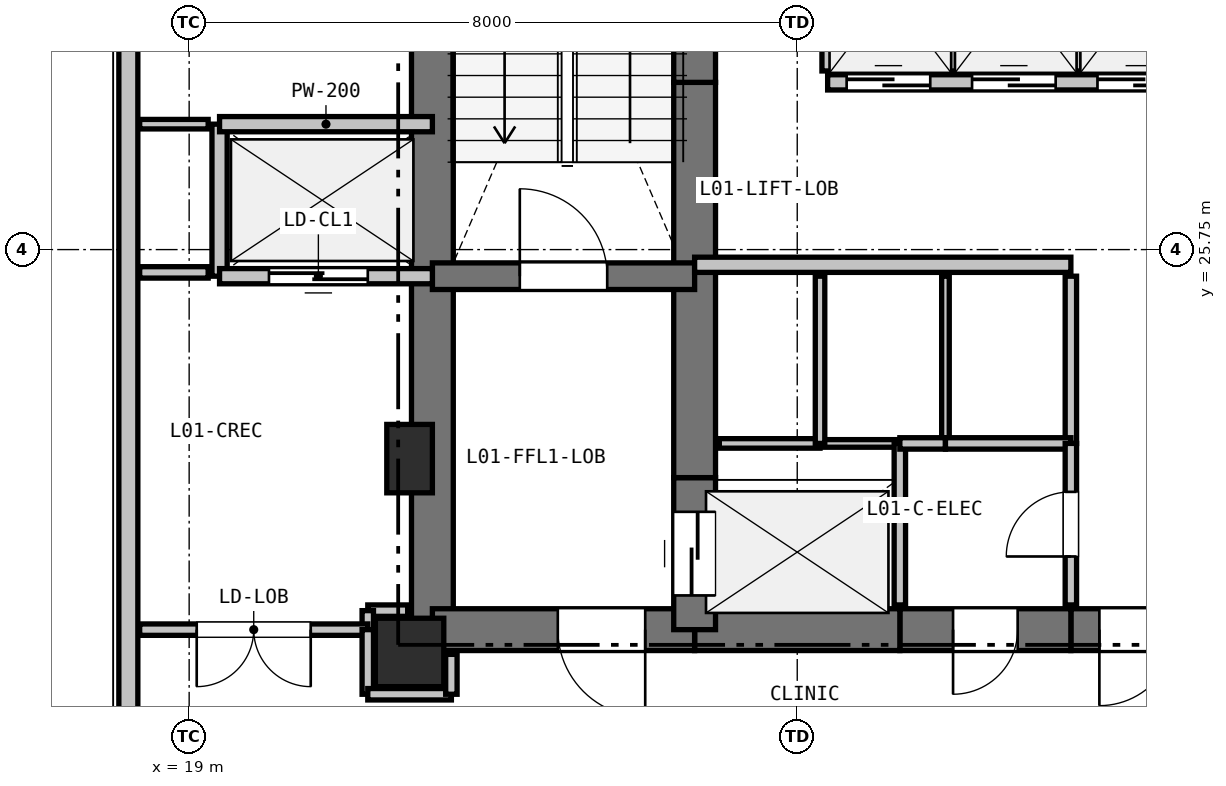
"""IFC4 building model, lengths in metres.
Left out: names, types, materials, properties, quantities, classifications, styles, units other than length and angle.
Written with IfcOpenShell. Run it as: python <this file> out.ifc"""

import sys

from ifc_helpers import new_model, si_unit, direction, frame, frame_2d, origin, origin_2d, place, context, subcontext, project, spatial, rectangle, extrude, element, fill, save


model = new_model("IFC4")
c1 = context("Model", 3, precision=1e-05, world=origin(), true_north=direction((0.0, 1.0)))
c2 = subcontext(c1, "Body", "Model", "MODEL_VIEW")
j1 = project(units=[si_unit("LENGTHUNIT", "METRE"), si_unit("PLANEANGLEUNIT", "RADIAN")], contexts=[c1])
p1 = place(None, origin())
s1 = spatial("IfcSite", under=j1, at=p1, CompositionType="ELEMENT")
p2 = place(p1, origin())
s2 = spatial("IfcBuilding", under=s1, at=p2, CompositionType="ELEMENT")
p3 = place(p2, frame((0.0, 0.0, 5.1)))
s3 = spatial("IfcBuildingStorey", under=s2, at=p3, CompositionType="ELEMENT", Elevation=5.1)
p4 = place(p3, frame((21.9, 20.45, 0.0), z_axis=(0.0, 0.0, 1.0), x_axis=(1.0, 0.0, 0.0)))
e1 = element("IfcColumn", 1, at=p4, inside=s3, PredefinedType="COLUMN", context=c2, shape_type="SweptSolid", body=[
    extrude(rectangle(XDim=0.9, YDim=0.9, at=origin_2d()), origin(), (0.0, 0.0, 1.0), 4.5),
])
p5 = place(p3, frame((21.9, 23.0, 0.0), z_axis=(0.0, 0.0, 1.0), x_axis=(1.0, 0.0, 0.0)))
e2 = element("IfcColumn", 2, at=p5, inside=s3, PredefinedType="PILASTER", context=c2, shape_type="SweptSolid", body=[
    extrude(rectangle(XDim=0.6, YDim=0.9, at=origin_2d()), origin(), (0.0, 0.0, 1.0), 4.5),
])
p6 = place(p3, frame((18.2, 18.4, 0.0), z_axis=(0.0, 0.0, 1.0), x_axis=(0.0, 1.0, 0.0)))
e3 = element("IfcWall", 3, at=p6, inside=s3, PredefinedType="SOLIDWALL", context=c2, shape_type="SweptSolid", body=[
    extrude(rectangle(XDim=16.7, YDim=0.25, at=frame_2d((8.35, 0.0))), origin(), (0.0, 0.0, 1.0), 2.565),
])
p7 = place(p3, frame((22.2, 20.75, 0.0), z_axis=(0.0, 0.0, 1.0), x_axis=(0.0, 1.0, 0.0)))
e4 = element("IfcWall", 4, at=p7, inside=s3, PredefinedType="SHEAR", context=c2, shape_type="SweptSolid", body=[
    extrude(rectangle(XDim=4.65, YDim=0.55, at=frame_2d((2.325, 0.0))), origin(), (0.0, 0.0, 1.0), 4.18),
])
p8 = place(p3, frame((22.2, 25.4, 0.0), z_axis=(0.0, 0.0, 1.0), x_axis=(0.0, 1.0, 0.0)))
e5 = element("IfcWall", 5, at=p8, inside=s3, PredefinedType="SHEAR", context=c2, shape_type="SweptSolid", body=[
    extrude(rectangle(XDim=7.35, YDim=0.55, at=frame_2d((3.675, 0.0))), origin(), (0.0, 0.0, 1.0), 4.18),
])
p9 = place(p3, frame((32.35, 20.75, 0.0), z_axis=(0.0, 0.0, 1.0), x_axis=(-1.0, 0.0, 0.0)))
e6 = element("IfcWall", 6, at=p9, inside=s3, PredefinedType="SHEAR", context=c2, shape_type="SweptSolid", body=[
    extrude(rectangle(XDim=1.75, YDim=0.55, at=frame_2d((0.875, 0.0))), origin(), (0.0, 0.0, 1.0), 4.18),
])
p10 = place(p9, frame((0.375, 0.0, 0.0)))
e7 = element("IfcOpeningElement", 7, at=p10, cuts=e6, PredefinedType="OPENING", context=c2, shape_type="SweptSolid", body=[
    extrude(rectangle(XDim=1.0, YDim=2.15, at=frame_2d((0.5, 1.075))), frame((0.0, 0.285, 0.0), z_axis=(0.0, -1.0, 0.0), x_axis=(1.0, 0.0, 0.0)), (0.0, 0.0, 1.0), 0.57),
])
p11 = place(p3, frame((30.6, 20.75, 0.0), z_axis=(0.0, 0.0, 1.0), x_axis=(-1.0, 0.0, 0.0)))
e8 = element("IfcWall", 8, at=p11, inside=s3, PredefinedType="SHEAR", context=c2, shape_type="SweptSolid", body=[
    extrude(rectangle(XDim=2.25, YDim=0.55, at=frame_2d((1.125, 0.0))), origin(), (0.0, 0.0, 1.0), 4.18),
])
p12 = place(p11, frame((0.7, 0.0, 0.0)))
e9 = element("IfcOpeningElement", 9, at=p12, cuts=e8, PredefinedType="OPENING", context=c2, shape_type="SweptSolid", body=[
    extrude(rectangle(XDim=0.85, YDim=2.1, at=frame_2d((0.425, 1.05))), frame((0.0, 0.285, 0.0), z_axis=(0.0, -1.0, 0.0), x_axis=(1.0, 0.0, 0.0)), (0.0, 0.0, 1.0), 0.57),
])
p13 = place(p3, frame((28.35, 20.75, 0.0), z_axis=(0.0, 0.0, 1.0), x_axis=(-1.0, 0.0, 0.0)))
e10 = element("IfcWall", 10, at=p13, inside=s3, PredefinedType="SHEAR", context=c2, shape_type="SweptSolid", body=[
    extrude(rectangle(XDim=2.7, YDim=0.55, at=frame_2d((1.35, 0.0))), origin(), (0.0, 0.0, 1.0), 4.18),
])
p14 = place(p3, frame((25.65, 20.75, 0.0), z_axis=(0.0, 0.0, 1.0), x_axis=(-1.0, 0.0, 0.0)))
e11 = element("IfcWall", 11, at=p14, inside=s3, PredefinedType="SHEAR", context=c2, shape_type="SweptSolid", body=[
    extrude(rectangle(XDim=3.45, YDim=0.55, at=frame_2d((1.725, 0.0))), origin(), (0.0, 0.0, 1.0), 4.18),
])
p15 = place(p14, frame((0.65, 0.0, 0.0)))
e12 = element("IfcOpeningElement", 12, at=p15, cuts=e11, PredefinedType="OPENING", context=c2, shape_type="SweptSolid", body=[
    extrude(rectangle(XDim=1.15, YDim=2.15, at=frame_2d((0.575, 1.075))), frame((0.0, 0.285, 0.0), z_axis=(0.0, -1.0, 0.0), x_axis=(1.0, 0.0, 0.0)), (0.0, 0.0, 1.0), 0.57),
])
p16 = place(p3, frame((25.65, 20.75, 0.0), z_axis=(0.0, 0.0, 1.0), x_axis=(0.0, 1.0, 0.0)))
e13 = element("IfcWall", 13, at=p16, inside=s3, PredefinedType="SHEAR", context=c2, shape_type="SweptSolid", body=[
    extrude(rectangle(XDim=2.0, YDim=0.55, at=frame_2d((1.0, 0.0))), origin(), (0.0, 0.0, 1.0), 4.18),
])
p17 = place(p16, frame((0.45, 0.0, 0.0)))
e14 = element("IfcOpeningElement", 14, at=p17, cuts=e13, PredefinedType="OPENING", context=c2, shape_type="SweptSolid", body=[
    extrude(rectangle(XDim=1.1, YDim=2.15, at=frame_2d((0.55, 1.075))), frame((0.0, 0.285, 0.0), z_axis=(0.0, -1.0, 0.0), x_axis=(1.0, 0.0, 0.0)), (0.0, 0.0, 1.0), 0.57),
])
p18 = place(p3, frame((25.65, 22.75, 0.0), z_axis=(0.0, 0.0, 1.0), x_axis=(0.0, 1.0, 0.0)))
e15 = element("IfcWall", 15, at=p18, inside=s3, PredefinedType="SHEAR", context=c2, shape_type="SweptSolid", body=[
    extrude(rectangle(XDim=2.8, YDim=0.55, at=frame_2d((1.4, 0.0))), origin(), (0.0, 0.0, 1.0), 4.18),
])
p19 = place(p3, frame((25.65, 25.55, 0.0), z_axis=(0.0, 0.0, 1.0), x_axis=(0.0, 1.0, 0.0)))
e16 = element("IfcWall", 16, at=p19, inside=s3, PredefinedType="SHEAR", context=c2, shape_type="SweptSolid", body=[
    extrude(rectangle(XDim=2.4, YDim=0.55, at=frame_2d((1.2, 0.0))), origin(), (0.0, 0.0, 1.0), 4.18),
])
p20 = place(p3, frame((25.65, 27.95, 0.0), z_axis=(0.0, 0.0, 1.0), x_axis=(0.0, 1.0, 0.0)))
e17 = element("IfcWall", 17, at=p20, inside=s3, PredefinedType="SHEAR", context=c2, shape_type="SweptSolid", body=[
    extrude(rectangle(XDim=4.8, YDim=0.55, at=frame_2d((2.4, 0.0))), origin(), (0.0, 0.0, 1.0), 4.18),
])
p21 = place(p3, frame((22.2, 25.4, 0.0), z_axis=(0.0, 0.0, 1.0), x_axis=(1.0, 0.0, 0.0)))
e18 = element("IfcWall", 18, at=p21, inside=s3, PredefinedType="SHEAR", context=c2, shape_type="SweptSolid", body=[
    extrude(rectangle(XDim=3.45, YDim=0.35, at=frame_2d((1.725, 0.0))), origin(), (0.0, 0.0, 1.0), 4.18),
])
p22 = place(p21, frame((1.15, 0.0, 0.0)))
e19 = element("IfcOpeningElement", 19, at=p22, cuts=e18, PredefinedType="OPENING", context=c2, shape_type="SweptSolid", body=[
    extrude(rectangle(XDim=1.15, YDim=2.15, at=frame_2d((0.575, 1.075))), frame((0.0, 0.185, 0.0), z_axis=(0.0, -1.0, 0.0), x_axis=(1.0, 0.0, 0.0)), (0.0, 0.0, 1.0), 0.37),
])
p23 = place(p3, frame((25.65, 25.55, 0.0), z_axis=(0.0, 0.0, 1.0), x_axis=(1.0, 0.0, 0.0)))
e20 = element("IfcWall", 20, at=p23, inside=s3, PredefinedType="PARTITIONING", context=c2, shape_type="SweptSolid", body=[
    extrude(rectangle(XDim=4.95, YDim=0.2, at=frame_2d((2.475, 0.0))), origin(), (0.0, 0.0, 1.0), 4.18),
])
p24 = place(p3, frame((27.4, 27.95, 0.0), z_axis=(0.0, 0.0, 1.0), x_axis=(1.0, 0.0, 0.0)))
e21 = element("IfcWall", 21, at=p24, inside=s3, PredefinedType="PARTITIONING", context=c2, shape_type="SweptSolid", body=[
    extrude(rectangle(XDim=4.95, YDim=0.2, at=frame_2d((2.475, 0.0))), origin(), (0.0, 0.0, 1.0), 4.18),
])
p25 = place(p24, frame((0.25, 0.0, 0.0)))
e22 = element("IfcOpeningElement", 22, at=p25, cuts=e21, PredefinedType="OPENING", context=c2, shape_type="SweptSolid", body=[
    extrude(rectangle(XDim=1.1, YDim=2.15, at=frame_2d((0.55, 1.075))), frame((0.0, 0.11, 0.0), z_axis=(0.0, -1.0, 0.0), x_axis=(1.0, 0.0, 0.0)), (0.0, 0.0, 1.0), 0.22),
])
p26 = place(p24, frame((1.9, 0.0, 0.0)))
e23 = element("IfcOpeningElement", 23, at=p26, cuts=e21, PredefinedType="OPENING", context=c2, shape_type="SweptSolid", body=[
    extrude(rectangle(XDim=1.1, YDim=2.15, at=frame_2d((0.55, 1.075))), frame((0.0, 0.11, 0.0), z_axis=(0.0, -1.0, 0.0), x_axis=(1.0, 0.0, 0.0)), (0.0, 0.0, 1.0), 0.22),
])
p27 = place(p24, frame((3.55, 0.0, 0.0)))
e24 = element("IfcOpeningElement", 24, at=p27, cuts=e21, PredefinedType="OPENING", context=c2, shape_type="SweptSolid", body=[
    extrude(rectangle(XDim=1.1, YDim=2.15, at=frame_2d((0.55, 1.075))), frame((0.0, 0.11, 0.0), z_axis=(0.0, -1.0, 0.0), x_axis=(1.0, 0.0, 0.0)), (0.0, 0.0, 1.0), 0.22),
])
p28 = place(p3, frame((19.4, 25.4, 0.0), z_axis=(0.0, 0.0, 1.0), x_axis=(0.0, 1.0, 0.0)))
e25 = element("IfcWall", 25, at=p28, inside=s3, PredefinedType="PARTITIONING", context=c2, shape_type="SweptSolid", body=[
    extrude(rectangle(XDim=2.0, YDim=0.2, at=frame_2d((1.0, 0.0))), origin(), (0.0, 0.0, 1.0), 2.565),
])
p29 = place(p3, frame((19.4, 27.4, 0.0), z_axis=(0.0, 0.0, 1.0), x_axis=(1.0, 0.0, 0.0)))
e26 = element("IfcWall", 26, at=p29, inside=s3, PredefinedType="PARTITIONING", context=c2, shape_type="SweptSolid", body=[
    extrude(rectangle(XDim=2.8, YDim=0.2, at=frame_2d((1.4, 0.0))), origin(), (0.0, 0.0, 1.0), 3.628),
])
p30 = place(p3, frame((22.2, 25.4, 0.0), z_axis=(0.0, 0.0, 1.0), x_axis=(-1.0, 0.0, 0.0)))
e27 = element("IfcWall", 27, at=p30, inside=s3, PredefinedType="PARTITIONING", context=c2, shape_type="SweptSolid", body=[
    extrude(rectangle(XDim=2.8, YDim=0.2, at=frame_2d((1.4, 0.0))), origin(), (0.0, 0.0, 1.0), 2.565),
])
p31 = place(p30, frame((0.85, 0.0, 0.0)))
e28 = element("IfcOpeningElement", 28, at=p31, cuts=e27, PredefinedType="OPENING", context=c2, shape_type="SweptSolid", body=[
    extrude(rectangle(XDim=1.3, YDim=2.2, at=frame_2d((0.65, 1.1))), frame((0.0, 0.11, 0.0), z_axis=(0.0, -1.0, 0.0), x_axis=(1.0, 0.0, 0.0)), (0.0, 0.0, 1.0), 0.22),
])
p32 = place(p3, frame((25.975, 23.2, 0.0), z_axis=(0.0, 0.0, 1.0), x_axis=(1.0, 0.0, 0.0)))
e29 = element("IfcWall", 29, at=p32, inside=s3, PredefinedType="PARTITIONING", context=c2, shape_type="SweptSolid", body=[
    extrude(rectangle(XDim=1.325, YDim=0.125, at=frame_2d((0.663, 0.0))), origin(), (0.0, 0.0, 1.0), 4.18),
])
p33 = place(p3, frame((27.3, 23.2, 0.0), z_axis=(0.0, 0.0, 1.0), x_axis=(1.0, 0.0, 0.0)))
e30 = element("IfcWall", 30, at=p33, inside=s3, PredefinedType="PARTITIONING", context=c2, shape_type="SweptSolid", body=[
    extrude(rectangle(XDim=1.05, YDim=0.1, at=frame_2d((0.525, 0.0))), origin(), (0.0, 0.0, 1.0), 4.18),
])
p34 = place(p3, frame((28.35, 23.2, 0.0), z_axis=(0.0, 0.0, 1.0), x_axis=(0.0, -1.0, 0.0)))
e31 = element("IfcWall", 31, at=p34, inside=s3, PredefinedType="PARTITIONING", context=c2, shape_type="SweptSolid", body=[
    extrude(rectangle(XDim=2.125, YDim=0.15, at=frame_2d((1.062, 0.0))), origin(), (0.0, 0.0, 1.0), 4.18),
])
p35 = place(p3, frame((27.3, 25.4, 0.0), z_axis=(0.0, 0.0, 1.0), x_axis=(0.0, -1.0, 0.0)))
e32 = element("IfcWall", 32, at=p35, inside=s3, PredefinedType="PARTITIONING", context=c2, shape_type="SweptSolid", body=[
    extrude(rectangle(XDim=2.2, YDim=0.125, at=frame_2d((1.1, 0.0))), origin(), (0.0, 0.0, 1.0), 4.18),
])
p36 = place(p3, frame((28.95, 25.4, 0.0), z_axis=(0.0, 0.0, 1.0), x_axis=(0.0, -1.0, 0.0)))
e33 = element("IfcWall", 33, at=p36, inside=s3, PredefinedType="PARTITIONING", context=c2, shape_type="SweptSolid", body=[
    extrude(rectangle(XDim=2.2, YDim=0.1, at=frame_2d((1.1, 0.0))), origin(), (0.0, 0.0, 1.0), 4.18),
])
p37 = place(p3, frame((28.95, 23.2, 0.0), z_axis=(0.0, 0.0, 1.0), x_axis=(-1.0, 0.0, 0.0)))
e34 = element("IfcWall", 34, at=p37, inside=s3, PredefinedType="PARTITIONING", context=c2, shape_type="SweptSolid", body=[
    extrude(rectangle(XDim=0.6, YDim=0.15, at=frame_2d((0.3, 0.0))), origin(), (0.0, 0.0, 1.0), 4.18),
])
p38 = place(p3, frame((30.6, 25.4, 0.0), z_axis=(0.0, 0.0, 1.0), x_axis=(0.0, -1.0, 0.0)))
e35 = element("IfcWall", 35, at=p38, inside=s3, PredefinedType="PARTITIONING", context=c2, shape_type="SweptSolid", body=[
    extrude(rectangle(XDim=2.2, YDim=0.15, at=frame_2d((1.1, 0.0))), origin(), (0.0, 0.0, 1.0), 4.18),
])
p39 = place(p3, frame((30.6, 23.2, 0.0), z_axis=(0.0, 0.0, 1.0), x_axis=(-1.0, 0.0, 0.0)))
e36 = element("IfcWall", 36, at=p39, inside=s3, PredefinedType="PARTITIONING", context=c2, shape_type="SweptSolid", body=[
    extrude(rectangle(XDim=1.65, YDim=0.15, at=frame_2d((0.825, 0.0))), origin(), (0.0, 0.0, 1.0), 4.18),
])
p40 = place(p3, frame((29.05, 30.3, 0.0), z_axis=(0.0, 0.0, 1.0), x_axis=(0.0, -1.0, 0.0)))
e37 = element("IfcWall", 37, at=p40, inside=s3, PredefinedType="PARTITIONING", context=c2, shape_type="SweptSolid", body=[
    extrude(rectangle(XDim=2.2, YDim=0.125, at=frame_2d((1.1, 0.0))), origin(), (0.0, 0.0, 1.0), 4.18),
])
p41 = place(p3, frame((27.4, 28.1, 0.0), z_axis=(0.0, 0.0, 1.0), x_axis=(0.0, 1.0, 0.0)))
e38 = element("IfcWall", 38, at=p41, inside=s3, PredefinedType="PARTITIONING", context=c2, shape_type="SweptSolid", body=[
    extrude(rectangle(XDim=2.2, YDim=0.15, at=frame_2d((1.1, 0.0))), origin(), (0.0, 0.0, 1.0), 4.18),
])
p42 = place(p3, frame((30.7, 30.3, 0.0), z_axis=(0.0, 0.0, 1.0), x_axis=(0.0, -1.0, 0.0)))
e39 = element("IfcWall", 39, at=p42, inside=s3, PredefinedType="PARTITIONING", context=c2, shape_type="SweptSolid", body=[
    extrude(rectangle(XDim=2.2, YDim=0.1, at=frame_2d((1.1, 0.0))), origin(), (0.0, 0.0, 1.0), 4.18),
])
p43 = place(p3, frame((30.6, 21.075, 0.0), z_axis=(0.0, 0.0, 1.0), x_axis=(0.0, 1.0, 0.0)))
e40 = element("IfcWall", 40, at=p43, inside=s3, PredefinedType="PARTITIONING", context=c2, shape_type="SweptSolid", body=[
    extrude(rectangle(XDim=2.125, YDim=0.15, at=frame_2d((1.062, 0.0))), origin(), (0.0, 0.0, 1.0), 4.18),
])
p44 = place(p43, frame((0.637, 0.0, 0.0)))
e41 = element("IfcOpeningElement", 41, at=p44, cuts=e40, PredefinedType="OPENING", context=c2, shape_type="SweptSolid", body=[
    extrude(rectangle(XDim=0.85, YDim=2.1, at=frame_2d((0.425, 1.05))), frame((0.0, 0.085, 0.0), z_axis=(0.0, -1.0, 0.0), x_axis=(1.0, 0.0, 0.0)), (0.0, 0.0, 1.0), 0.17),
])
p45 = place(p3, frame((18.349, 25.45, 0.0), z_axis=(0.0, 0.0, 1.0), x_axis=(1.0, 0.0, 0.0)))
e42 = element("IfcWall", 42, at=p45, inside=s3, PredefinedType="PARTITIONING", context=c2, shape_type="SweptSolid", body=[
    extrude(rectangle(XDim=0.901, YDim=0.15, at=frame_2d((0.45, 0.0))), origin(), (0.0, 0.0, 1.0), 2.565),
])
p46 = place(p3, frame((21.875, 21.0, 0.0), z_axis=(0.0, 0.0, 1.0), x_axis=(-1.0, 0.0, 0.0)))
e43 = element("IfcWall", 43, at=p46, inside=s3, PredefinedType="PARTITIONING", context=c2, shape_type="SweptSolid", body=[
    extrude(rectangle(XDim=0.525, YDim=0.15, at=frame_2d((0.262, 0.0))), origin(), (0.0, 0.0, 1.0), 3.628),
])
p47 = place(p3, frame((21.35, 21.0, 0.0), z_axis=(0.0, 0.0, 1.0), x_axis=(0.0, -1.0, 0.0)))
e44 = element("IfcWall", 44, at=p47, inside=s3, PredefinedType="PARTITIONING", context=c2, shape_type="SweptSolid", body=[
    extrude(rectangle(XDim=0.25, YDim=0.15, at=frame_2d((0.125, 0.0))), origin(), (0.0, 0.0, 1.0), 4.18),
])
p48 = place(p3, frame((21.35, 20.75, 0.0), z_axis=(0.0, 0.0, 1.0), x_axis=(-1.0, 0.0, 0.0)))
e45 = element("IfcWall", 45, at=p48, inside=s3, PredefinedType="PARTITIONING", context=c2, shape_type="SweptSolid", body=[
    extrude(rectangle(XDim=3.001, YDim=0.15, at=frame_2d((1.5, 0.0))), origin(), (0.0, 0.0, 1.0), 4.18),
])
p49 = place(p48, frame((0.75, 0.0, 0.0)))
e46 = element("IfcOpeningElement", 46, at=p49, cuts=e45, PredefinedType="OPENING", context=c2, shape_type="SweptSolid", body=[
    extrude(rectangle(XDim=1.5, YDim=2.2, at=frame_2d((0.75, 1.1))), frame((0.0, 0.085, 0.0), z_axis=(0.0, -1.0, 0.0), x_axis=(1.0, 0.0, 0.0)), (0.0, 0.0, 1.0), 0.17),
])
p50 = place(p3, frame((21.35, 20.75, 0.0), z_axis=(0.0, 0.0, 1.0), x_axis=(0.0, -1.0, 0.0)))
e47 = element("IfcWall", 47, at=p50, inside=s3, PredefinedType="PARTITIONING", context=c2, shape_type="SweptSolid", body=[
    extrude(rectangle(XDim=0.85, YDim=0.15, at=frame_2d((0.425, 0.0))), origin(), (0.0, 0.0, 1.0), 4.18),
])
p51 = place(p3, frame((21.35, 19.9, 0.0), z_axis=(0.0, 0.0, 1.0), x_axis=(1.0, 0.0, 0.0)))
e48 = element("IfcWall", 48, at=p51, inside=s3, PredefinedType="PARTITIONING", context=c2, shape_type="SweptSolid", body=[
    extrude(rectangle(XDim=1.1, YDim=0.15, at=frame_2d((0.55, 0.0))), origin(), (0.0, 0.0, 1.0), 4.18),
])
p52 = place(p3, frame((22.45, 19.9, 0.0), z_axis=(0.0, 0.0, 1.0), x_axis=(0.0, 1.0, 0.0)))
e49 = element("IfcWall", 49, at=p52, inside=s3, PredefinedType="PARTITIONING", context=c2, shape_type="SweptSolid", body=[
    extrude(rectangle(XDim=0.525, YDim=0.15, at=frame_2d((0.263, 0.0))), origin(), (0.0, 0.0, 1.0), 3.628),
])
p53 = place(p3, frame((19.25, 27.4, 0.0), z_axis=(0.0, 0.0, 1.0), x_axis=(-1.0, 0.0, 0.0)))
e50 = element("IfcWall", 50, at=p53, inside=s3, PredefinedType="PARTITIONING", context=c2, shape_type="SweptSolid", body=[
    extrude(rectangle(XDim=0.901, YDim=0.125, at=frame_2d((0.45, 0.0))), origin(), (0.0, 0.0, 1.0), 2.815),
])
p54 = place(p25, origin())
e51 = element("IfcDoor", 51, at=p54, inside=s3, OperationType="SLIDING_TO_LEFT", PredefinedType="DOOR", context=c2, shape_type="SweptSolid", body=[
    extrude(rectangle(XDim=1.1, YDim=2.15, at=frame_2d((0.55, 1.075))), frame((0.0, 0.025, 0.0), z_axis=(0.0, -1.0, 0.0), x_axis=(1.0, 0.0, 0.0)), (0.0, 0.0, 1.0), 0.05),
])
fill(e22, e51)
p55 = place(p26, origin())
e52 = element("IfcDoor", 52, at=p55, inside=s3, OperationType="SLIDING_TO_LEFT", PredefinedType="DOOR", context=c2, shape_type="SweptSolid", body=[
    extrude(rectangle(XDim=1.1, YDim=2.15, at=frame_2d((0.55, 1.075))), frame((0.0, 0.025, 0.0), z_axis=(0.0, -1.0, 0.0), x_axis=(1.0, 0.0, 0.0)), (0.0, 0.0, 1.0), 0.05),
])
fill(e23, e52)
p56 = place(p27, origin())
e53 = element("IfcDoor", 53, at=p56, inside=s3, OperationType="SLIDING_TO_LEFT", PredefinedType="DOOR", context=c2, shape_type="SweptSolid", body=[
    extrude(rectangle(XDim=1.1, YDim=2.15, at=frame_2d((0.55, 1.075))), frame((0.0, 0.025, 0.0), z_axis=(0.0, -1.0, 0.0), x_axis=(1.0, 0.0, 0.0)), (0.0, 0.0, 1.0), 0.05),
])
fill(e24, e53)
p57 = place(p10, origin())
e54 = element("IfcDoor", 54, at=p57, inside=s3, OperationType="SINGLE_SWING_RIGHT", PredefinedType="DOOR", context=c2, shape_type="SweptSolid", body=[
    extrude(rectangle(XDim=1.0, YDim=2.15, at=frame_2d((0.5, 1.075))), frame((0.0, 0.025, 0.0), z_axis=(0.0, -1.0, 0.0), x_axis=(1.0, 0.0, 0.0)), (0.0, 0.0, 1.0), 0.05),
])
fill(e7, e54)
p58 = place(p17, origin())
e55 = element("IfcDoor", 55, at=p58, inside=s3, OperationType="SLIDING_TO_LEFT", PredefinedType="DOOR", context=c2, shape_type="SweptSolid", body=[
    extrude(rectangle(XDim=1.1, YDim=2.15, at=frame_2d((0.55, 1.075))), frame((0.0, 0.025, 0.0), z_axis=(0.0, -1.0, 0.0), x_axis=(1.0, 0.0, 0.0)), (0.0, 0.0, 1.0), 0.05),
])
fill(e14, e55)
p59 = place(p31, origin())
e56 = element("IfcDoor", 56, at=p59, inside=s3, OperationType="SLIDING_TO_LEFT", PredefinedType="DOOR", context=c2, shape_type="SweptSolid", body=[
    extrude(rectangle(XDim=1.3, YDim=2.2, at=frame_2d((0.65, 1.1))), frame((0.0, 0.025, 0.0), z_axis=(0.0, -1.0, 0.0), x_axis=(1.0, 0.0, 0.0)), (0.0, 0.0, 1.0), 0.05),
])
fill(e28, e56)
p60 = place(p22, origin())
e57 = element("IfcDoor", 57, at=p60, inside=s3, OperationType="SINGLE_SWING_LEFT", PredefinedType="DOOR", context=c2, shape_type="SweptSolid", body=[
    extrude(rectangle(XDim=1.15, YDim=2.15, at=frame_2d((0.575, 1.075))), frame((0.0, 0.025, 0.0), z_axis=(0.0, -1.0, 0.0), x_axis=(1.0, 0.0, 0.0)), (0.0, 0.0, 1.0), 0.05),
])
fill(e19, e57)
p61 = place(p15, origin())
e58 = element("IfcDoor", 58, at=p61, inside=s3, OperationType="SINGLE_SWING_LEFT", PredefinedType="DOOR", context=c2, shape_type="SweptSolid", body=[
    extrude(rectangle(XDim=1.15, YDim=2.15, at=frame_2d((0.575, 1.075))), frame((0.0, 0.025, 0.0), z_axis=(0.0, -1.0, 0.0), x_axis=(1.0, 0.0, 0.0)), (0.0, 0.0, 1.0), 0.05),
])
fill(e12, e58)
p62 = place(p44, origin())
e59 = element("IfcDoor", 59, at=p62, inside=s3, OperationType="SINGLE_SWING_LEFT", PredefinedType="DOOR", context=c2, shape_type="SweptSolid", body=[
    extrude(rectangle(XDim=0.85, YDim=2.1, at=frame_2d((0.425, 1.05))), frame((0.0, 0.025, 0.0), z_axis=(0.0, -1.0, 0.0), x_axis=(1.0, 0.0, 0.0)), (0.0, 0.0, 1.0), 0.05),
])
fill(e41, e59)
p63 = place(p49, origin())
e60 = element("IfcDoor", 60, at=p63, inside=s3, OperationType="DOUBLE_DOOR_SINGLE_SWING", PredefinedType="DOOR", context=c2, shape_type="SweptSolid", body=[
    extrude(rectangle(XDim=1.5, YDim=2.2, at=frame_2d((0.75, 1.1))), frame((0.0, 0.025, 0.0), z_axis=(0.0, -1.0, 0.0), x_axis=(1.0, 0.0, 0.0)), (0.0, 0.0, 1.0), 0.05),
])
fill(e46, e60)
p64 = place(p12, origin())
e61 = element("IfcDoor", 61, at=p64, inside=s3, OperationType="SINGLE_SWING_RIGHT", PredefinedType="DOOR", context=c2, shape_type="SweptSolid", body=[
    extrude(rectangle(XDim=0.85, YDim=2.1, at=frame_2d((0.425, 1.05))), frame((0.0, 0.025, 0.0), z_axis=(0.0, -1.0, 0.0), x_axis=(1.0, 0.0, 0.0)), (0.0, 0.0, 1.0), 0.05),
])
fill(e9, e61)
save(model, sys.argv[1])
